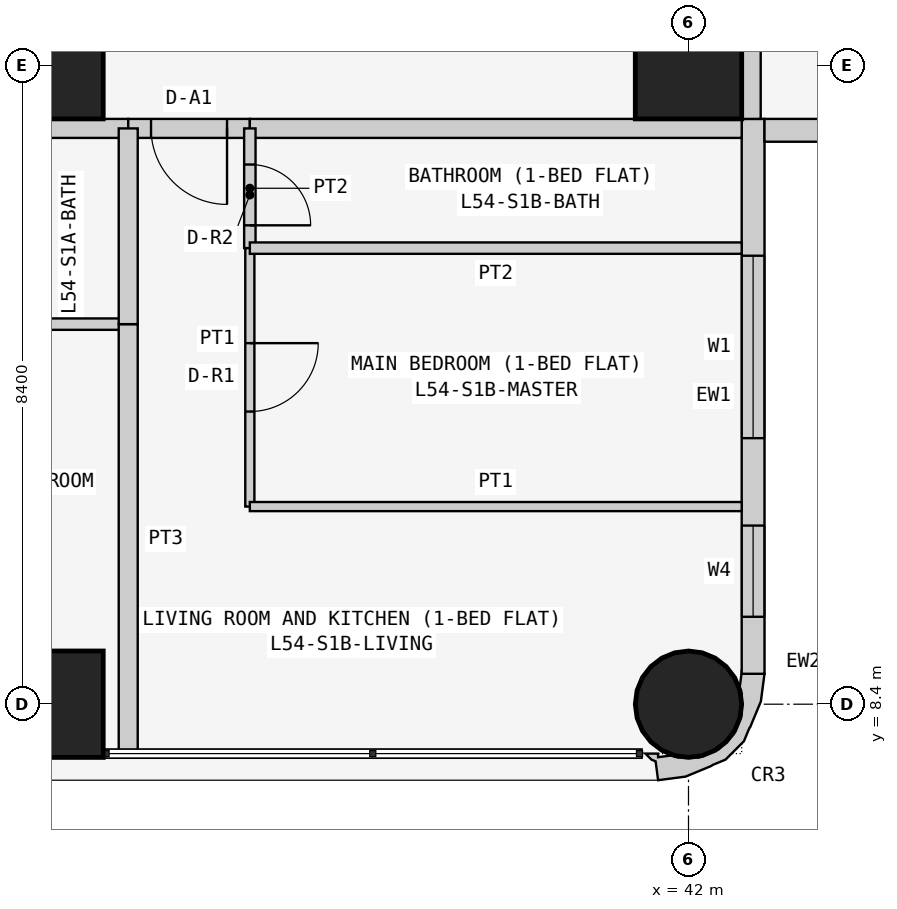
"""IFC4 building model, lengths in metres.
Left out: names, types, materials, properties, quantities, classifications, styles, units other than length and angle.
Written with IfcOpenShell. Run it as: python <this file> out.ifc"""

import sys

from ifc_helpers import new_model, si_unit, direction, frame, frame_2d, origin, origin_2d, place, context, subcontext, project, spatial, polyline, rectangle, circle, outline, extrude, element, fill, save


model = new_model("IFC4")
c1 = context("Model", 3, precision=1e-05, world=origin(), true_north=direction((0.0, 1.0)))
c2 = subcontext(c1, "Body", "Model", "MODEL_VIEW")
j1 = project(units=[si_unit("LENGTHUNIT", "METRE"), si_unit("PLANEANGLEUNIT", "RADIAN")], contexts=[c1])
p1 = place(None, origin())
s1 = spatial("IfcSite", under=j1, at=p1, CompositionType="ELEMENT")
p2 = place(p1, origin())
s2 = spatial("IfcBuilding", under=s1, at=p2, CompositionType="ELEMENT")
p3 = place(p2, frame((0.0, 0.0, 208.5)))
s3 = spatial("IfcBuildingStorey", under=s2, at=p3, CompositionType="ELEMENT", Elevation=208.5)
for number, where, z_axis, x_axis in (
    (1, (33.6, 8.4, 0.0), (0.0, 0.0, 1.0), (1.0, 0.0, 0.0)),
    (2, (33.6, 16.8, 0.0), (0.0, 0.0, 1.0), (1.0, 0.0, 0.0)),
):
    element("IfcColumn", number, at=place(p3, frame(where, z_axis=z_axis, x_axis=x_axis)), inside=s3, PredefinedType="COLUMN", context=c2, shape_type="SweptSolid", body=[
        extrude(rectangle(XDim=1.4, YDim=1.4, at=origin_2d()), origin(), (0.0, 0.0, 1.0), 3.6),
    ])
p4 = place(p3, frame((42.0, 8.4, 0.0), z_axis=(0.0, 0.0, 1.0), x_axis=(1.0, 0.0, 0.0)))
e3 = element("IfcColumn", 3, at=p4, inside=s3, PredefinedType="COLUMN", context=c2, shape_type="SweptSolid", body=[
    extrude(circle(Radius=0.7, at=origin_2d()), origin(), (0.0, 0.0, 1.0), 3.6),
])
p5 = place(p3, frame((42.0, 16.8, 0.0), z_axis=(0.0, 0.0, 1.0), x_axis=(1.0, 0.0, 0.0)))
e4 = element("IfcColumn", 4, at=p5, inside=s3, PredefinedType="COLUMN", context=c2, shape_type="SweptSolid", body=[
    extrude(rectangle(XDim=1.4, YDim=1.4, at=origin_2d()), origin(), (0.0, 0.0, 1.0), 3.6),
])
p6 = place(p3, frame((42.85, 8.8, 0.0), z_axis=(0.0, 0.0, 1.0), x_axis=(0.0, 1.0, 0.0)))
e5 = element("IfcWall", 5, at=p6, inside=s3, PredefinedType="SOLIDWALL", context=c2, shape_type="SweptSolid", body=[
    extrude(rectangle(XDim=7.3, YDim=0.3, at=frame_2d((3.65, 0.0))), origin(), (0.0, 0.0, 1.0), 3.45),
])
p7 = place(p6, frame((3.1, 0.0, 0.9)))
e6 = element("IfcOpeningElement", 6, at=p7, cuts=e5, PredefinedType="OPENING", context=c2, shape_type="SweptSolid", body=[
    extrude(rectangle(XDim=2.4, YDim=1.5, at=frame_2d((1.2, 0.75))), frame((0.0, 0.16, 0.0), z_axis=(0.0, -1.0, 0.0), x_axis=(1.0, 0.0, 0.0)), (0.0, 0.0, 1.0), 0.32),
])
p8 = place(p6, frame((0.75, 0.0, 0.9)))
e7 = element("IfcOpeningElement", 7, at=p8, cuts=e5, PredefinedType="OPENING", context=c2, shape_type="SweptSolid", body=[
    extrude(rectangle(XDim=1.2, YDim=1.5, at=frame_2d((0.6, 0.75))), frame((0.0, 0.16, 0.0), z_axis=(0.0, -1.0, 0.0), x_axis=(1.0, 0.0, 0.0)), (0.0, 0.0, 1.0), 0.32),
])
p9 = place(p3, frame((43.0, 15.95, 0.0), z_axis=(0.0, 0.0, 1.0), x_axis=(1.0, 0.0, 0.0)))
e8 = element("IfcWall", 8, at=p9, inside=s3, PredefinedType="SOLIDWALL", context=c2, shape_type="SweptSolid", body=[
    extrude(rectangle(XDim=7.0, YDim=0.3, at=frame_2d((3.5, 0.0))), origin(), (0.0, 0.0, 1.0), 3.45),
])
p10 = place(p9, frame((1.5, 0.0, 0.9)))
e9 = element("IfcOpeningElement", 9, at=p10, cuts=e8, PredefinedType="OPENING", context=c2, shape_type="SweptSolid", body=[
    extrude(rectangle(XDim=2.4, YDim=1.5, at=frame_2d((1.2, 0.75))), frame((0.0, 0.16, 0.0), z_axis=(0.0, -1.0, 0.0), x_axis=(1.0, 0.0, 0.0)), (0.0, 0.0, 1.0), 0.32),
])
p11 = place(p9, frame((5.05, 0.0, 0.9)))
e10 = element("IfcOpeningElement", 10, at=p11, cuts=e8, PredefinedType="OPENING", context=c2, shape_type="SweptSolid", body=[
    extrude(rectangle(XDim=1.2, YDim=1.5, at=frame_2d((0.6, 0.75))), frame((0.0, 0.16, 0.0), z_axis=(0.0, -1.0, 0.0), x_axis=(1.0, 0.0, 0.0)), (0.0, 0.0, 1.0), 0.32),
])
p12 = place(p3, frame((41.488, 7.812, 0.0), z_axis=(0.0, 0.0, 1.0), x_axis=(0.439933741929, -0.898030234854, 0.0)))
e11 = element("IfcWall", 11, at=p12, inside=s3, PredefinedType="SOLIDWALL", context=c2, shape_type="SweptSolid", body=[
    extrude(outline(polyline([(-0.222, 1.793), (-0.39, 1.541), (-0.372, 1.532), (-0.195, 1.414), (-0.12, 1.41), (0.131, 1.287), (0.315, 1.078), (0.406, 0.814), (0.388, 0.536), (0.265, 0.285), (0.209, 0.235), (0.148, 0.053), (0.105, 0.074), (0.032, -0.076), (0.138, -0.04), (0.182, -0.0), (0.419, -0.08), (0.536, 0.266), (0.559, 0.631), (0.555, 0.651), (0.566, 0.836), (0.455, 1.159), (0.333, 1.298), (0.324, 1.317), (0.082, 1.591), (-0.222, 1.793)])), origin(), (0.0, 0.0, 1.0), 3.45),
])
p13 = place(p3, frame((42.825, 22.971, 0.0), z_axis=(0.0, 0.0, 1.0), x_axis=(0.0, -1.0, 0.0)))
e12 = element("IfcWall", 12, at=p13, inside=s3, PredefinedType="PARTITIONING", context=c2, shape_type="SweptSolid", body=[
    extrude(rectangle(XDim=6.871, YDim=0.25, at=frame_2d((3.436, 0.0))), origin(), (0.0, 0.0, 1.0), 3.45),
])
p14 = place(p3, frame((34.629, 15.975, 0.0), z_axis=(0.0, 0.0, 1.0), x_axis=(-1.0, 0.0, 0.0)))
e13 = element("IfcWall", 13, at=p14, inside=s3, PredefinedType="PARTITIONING", context=c2, shape_type="SweptSolid", body=[
    extrude(rectangle(XDim=2.629, YDim=0.25, at=frame_2d((1.314, 0.0))), origin(), (0.0, 0.0, 1.0), 3.45),
])
p15 = place(p3, frame((36.229, 15.975, 0.0), z_axis=(0.0, 0.0, 1.0), x_axis=(-1.0, 0.0, 0.0)))
e14 = element("IfcWall", 14, at=p15, inside=s3, PredefinedType="PARTITIONING", context=c2, shape_type="SweptSolid", body=[
    extrude(rectangle(XDim=1.6, YDim=0.25, at=frame_2d((0.8, 0.0))), origin(), (0.0, 0.0, 1.0), 3.45),
])
p16 = place(p15, frame((0.3, 0.0, 0.0)))
e15 = element("IfcOpeningElement", 15, at=p16, cuts=e14, PredefinedType="OPENING", context=c2, shape_type="SweptSolid", body=[
    extrude(rectangle(XDim=1.0, YDim=2.1, at=frame_2d((0.5, 1.05))), frame((0.0, 0.135, 0.0), z_axis=(0.0, -1.0, 0.0), x_axis=(1.0, 0.0, 0.0)), (0.0, 0.0, 1.0), 0.27),
])
p17 = place(p3, frame((42.7, 15.975, 0.0), z_axis=(0.0, 0.0, 1.0), x_axis=(-1.0, 0.0, 0.0)))
e16 = element("IfcWall", 16, at=p17, inside=s3, PredefinedType="PARTITIONING", context=c2, shape_type="SweptSolid", body=[
    extrude(rectangle(XDim=6.471, YDim=0.25, at=frame_2d((3.235, 0.0))), origin(), (0.0, 0.0, 1.0), 3.45),
])
p18 = place(p3, frame((32.0, 13.4, 0.0), z_axis=(0.0, 0.0, 1.0), x_axis=(1.0, 0.0, 0.0)))
e17 = element("IfcWall", 17, at=p18, inside=s3, PredefinedType="PARTITIONING", context=c2, shape_type="SweptSolid", body=[
    extrude(rectangle(XDim=2.629, YDim=0.15, at=frame_2d((1.314, 0.0))), origin(), (0.0, 0.0, 1.0), 3.45),
])
p19 = place(p3, frame((34.629, 13.4, 0.0), z_axis=(0.0, 0.0, 1.0), x_axis=(0.0, -1.0, 0.0)))
e18 = element("IfcWall", 18, at=p19, inside=s3, PredefinedType="PARTITIONING", context=c2, shape_type="SweptSolid", body=[
    extrude(rectangle(XDim=5.65, YDim=0.25, at=frame_2d((2.825, 0.0))), origin(), (0.0, 0.0, 1.0), 3.45),
])
p20 = place(p3, frame((34.629, 13.4, 0.0), z_axis=(0.0, 0.0, 1.0), x_axis=(0.0, 1.0, 0.0)))
e19 = element("IfcWall", 19, at=p20, inside=s3, PredefinedType="PARTITIONING", context=c2, shape_type="SweptSolid", body=[
    extrude(rectangle(XDim=2.575, YDim=0.25, at=frame_2d((1.288, 0.0))), origin(), (0.0, 0.0, 1.0), 3.45),
])
p21 = place(p3, frame((36.229, 15.975, 0.0), z_axis=(0.0, 0.0, 1.0), x_axis=(0.0, -1.0, 0.0)))
e20 = element("IfcWall", 20, at=p21, inside=s3, PredefinedType="PARTITIONING", context=c2, shape_type="SweptSolid", body=[
    extrude(rectangle(XDim=1.575, YDim=0.15, at=frame_2d((0.788, 0.0))), origin(), (0.0, 0.0, 1.0), 3.45),
])
p22 = place(p21, frame((0.475, 0.0, 0.0)))
e21 = element("IfcOpeningElement", 21, at=p22, cuts=e20, PredefinedType="OPENING", context=c2, shape_type="SweptSolid", body=[
    extrude(rectangle(XDim=0.8, YDim=2.1, at=frame_2d((0.4, 1.05))), frame((0.0, 0.085, 0.0), z_axis=(0.0, -1.0, 0.0), x_axis=(1.0, 0.0, 0.0)), (0.0, 0.0, 1.0), 0.17),
])
p23 = place(p3, frame((36.229, 14.4, 0.0), z_axis=(0.0, 0.0, 1.0), x_axis=(0.0, -1.0, 0.0)))
e22 = element("IfcWall", 22, at=p23, inside=s3, PredefinedType="PARTITIONING", context=c2, shape_type="SweptSolid", body=[
    extrude(rectangle(XDim=3.4, YDim=0.12, at=frame_2d((1.7, 0.0))), origin(), (0.0, 0.0, 1.0), 3.45),
])
p24 = place(p23, frame((1.25, 0.0, 0.0)))
e23 = element("IfcOpeningElement", 23, at=p24, cuts=e22, PredefinedType="OPENING", context=c2, shape_type="SweptSolid", body=[
    extrude(rectangle(XDim=0.9, YDim=2.1, at=frame_2d((0.45, 1.05))), frame((0.0, 0.07, 0.0), z_axis=(0.0, -1.0, 0.0), x_axis=(1.0, 0.0, 0.0)), (0.0, 0.0, 1.0), 0.14),
])
p25 = place(p3, frame((36.229, 11.0, 0.0), z_axis=(0.0, 0.0, 1.0), x_axis=(1.0, 0.0, 0.0)))
e24 = element("IfcWall", 24, at=p25, inside=s3, PredefinedType="PARTITIONING", context=c2, shape_type="SweptSolid", body=[
    extrude(rectangle(XDim=6.471, YDim=0.12, at=frame_2d((3.235, 0.0))), origin(), (0.0, 0.0, 1.0), 3.45),
])
p26 = place(p3, frame((36.229, 14.4, 0.0), z_axis=(0.0, 0.0, 1.0), x_axis=(1.0, 0.0, 0.0)))
e25 = element("IfcWall", 25, at=p26, inside=s3, PredefinedType="PARTITIONING", context=c2, shape_type="SweptSolid", body=[
    extrude(rectangle(XDim=6.471, YDim=0.15, at=frame_2d((3.235, 0.0))), origin(), (0.0, 0.0, 1.0), 3.45),
])
p27 = place(p7, origin())
e26 = element("IfcWindow", 26, at=p27, inside=s3, PartitioningType="SINGLE_PANEL", PredefinedType="WINDOW", context=c2, shape_type="SweptSolid", body=[
    extrude(rectangle(XDim=2.4, YDim=1.5, at=frame_2d((1.2, 0.75))), frame((0.0, 0.03, 0.0), z_axis=(0.0, -1.0, 0.0), x_axis=(1.0, 0.0, 0.0)), (0.0, 0.0, 1.0), 0.06),
])
fill(e6, e26)
p28 = place(p8, origin())
e27 = element("IfcWindow", 27, at=p28, inside=s3, PartitioningType="SINGLE_PANEL", PredefinedType="WINDOW", context=c2, shape_type="SweptSolid", body=[
    extrude(rectangle(XDim=1.2, YDim=1.5, at=frame_2d((0.6, 0.75))), frame((0.0, 0.03, 0.0), z_axis=(0.0, -1.0, 0.0), x_axis=(1.0, 0.0, 0.0)), (0.0, 0.0, 1.0), 0.06),
])
fill(e7, e27)
p29 = place(p16, origin())
e28 = element("IfcDoor", 28, at=p29, inside=s3, OperationType="SINGLE_SWING_LEFT", PredefinedType="DOOR", context=c2, shape_type="SweptSolid", body=[
    extrude(rectangle(XDim=1.0, YDim=2.1, at=frame_2d((0.5, 1.05))), frame((0.0, 0.025, 0.0), z_axis=(0.0, -1.0, 0.0), x_axis=(1.0, 0.0, 0.0)), (0.0, 0.0, 1.0), 0.05),
])
fill(e15, e28)
p30 = place(p22, origin())
e29 = element("IfcDoor", 29, at=p30, inside=s3, OperationType="SINGLE_SWING_RIGHT", PredefinedType="DOOR", context=c2, shape_type="SweptSolid", body=[
    extrude(rectangle(XDim=0.8, YDim=2.1, at=frame_2d((0.4, 1.05))), frame((0.0, 0.025, 0.0), z_axis=(0.0, -1.0, 0.0), x_axis=(1.0, 0.0, 0.0)), (0.0, 0.0, 1.0), 0.05),
])
fill(e21, e29)
p31 = place(p24, origin())
e30 = element("IfcDoor", 30, at=p31, inside=s3, OperationType="SINGLE_SWING_LEFT", PredefinedType="DOOR", context=c2, shape_type="SweptSolid", body=[
    extrude(rectangle(XDim=0.9, YDim=2.1, at=frame_2d((0.45, 1.05))), frame((0.0, 0.025, 0.0), z_axis=(0.0, -1.0, 0.0), x_axis=(1.0, 0.0, 0.0)), (0.0, 0.0, 1.0), 0.05),
])
fill(e23, e30)
save(model, sys.argv[1])
